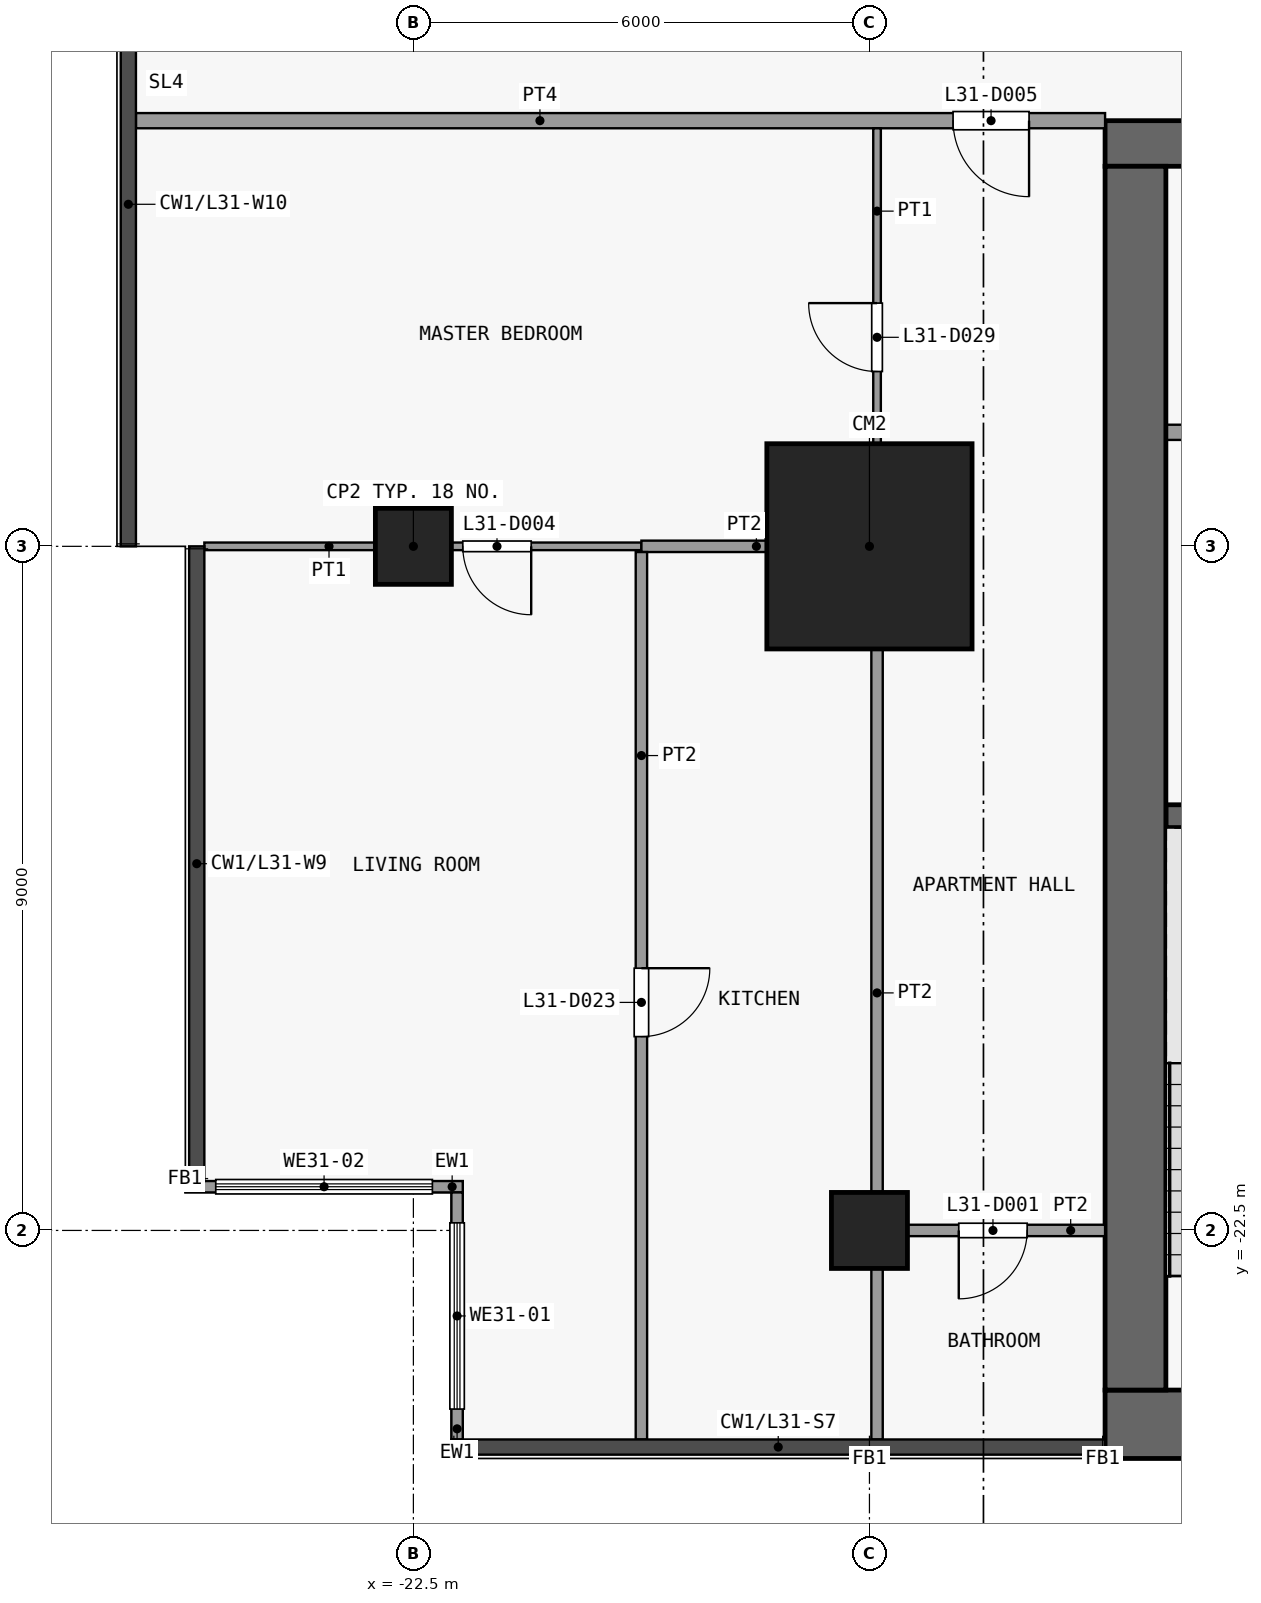
"""IFC4 building model, lengths in metres.
Left out: names, types, materials, properties, quantities, classifications, styles, units other than length and angle.
Written with IfcOpenShell. Run it as: python <this file> out.ifc"""

import sys

from ifc_helpers import new_model, si_unit, direction, frame, frame_2d, origin, origin_2d, place, context, subcontext, project, spatial, rectangle, extrude, element, fill, save


model = new_model("IFC4")
c1 = context("Model", 3, precision=1e-05, world=origin(), true_north=direction((0.0, 1.0)))
c2 = subcontext(c1, "Body", "Model", "MODEL_VIEW")
j1 = project(units=[si_unit("LENGTHUNIT", "METRE"), si_unit("PLANEANGLEUNIT", "RADIAN")], contexts=[c1])
p1 = place(None, origin())
s1 = spatial("IfcSite", under=j1, at=p1, CompositionType="ELEMENT")
p2 = place(p1, origin())
s2 = spatial("IfcBuilding", under=s1, at=p2, CompositionType="ELEMENT")
p3 = place(p2, frame((0.0, 0.0, 124.3)))
s3 = spatial("IfcBuildingStorey", under=s2, at=p3, CompositionType="ELEMENT", Elevation=124.3)
for number, where, z_axis, x_axis in (
    (1, (-22.5, -13.5, 0.0), (0.0, 0.0, 1.0), (1.0, 0.0, 0.0)),
    (2, (-16.5, -22.5, 0.0), (0.0, 0.0, 1.0), (1.0, 0.0, 0.0)),
):
    element("IfcColumn", number, at=place(p3, frame(where, z_axis=z_axis, x_axis=x_axis)), inside=s3, PredefinedType="COLUMN", context=c2, shape_type="SweptSolid", body=[
        extrude(rectangle(XDim=1.0, YDim=1.0, at=origin_2d()), origin(), (0.0, 0.0, 1.0), 3.6),
    ])
p4 = place(p3, frame((-16.5, -13.5, 0.0), z_axis=(0.0, 0.0, 1.0), x_axis=(1.0, 0.0, 0.0)))
e3 = element("IfcColumn", 3, at=p4, inside=s3, PredefinedType="COLUMN", context=c2, shape_type="SweptSolid", body=[
    extrude(rectangle(XDim=2.7, YDim=2.7, at=origin_2d()), origin(), (0.0, 0.0, 1.0), 3.6),
])
p5 = place(p3, frame((-13.4, -25.05, 0.0), z_axis=(0.0, 0.0, 1.0), x_axis=(1.0, 0.0, 0.0)))
e4 = element("IfcWall", 4, at=p5, inside=s3, PredefinedType="SHEAR", context=c2, shape_type="SweptSolid", body=[
    extrude(rectangle(XDim=26.8, YDim=0.9, at=frame_2d((13.4, 0.0))), origin(), (0.0, 0.0, 1.0), 3.3),
])
p6 = place(p3, frame((-13.4, -8.2, 0.0), z_axis=(0.0, 0.0, 1.0), x_axis=(1.0, 0.0, 0.0)))
e5 = element("IfcWall", 5, at=p6, inside=s3, PredefinedType="SHEAR", context=c2, shape_type="SweptSolid", body=[
    extrude(rectangle(XDim=26.8, YDim=0.6, at=frame_2d((13.4, 0.0))), origin(), (0.0, 0.0, 1.0), 3.3),
])
p7 = place(p6, frame((7.7, 0.0, 0.0)))
e6 = element("IfcOpeningElement", 6, at=p7, cuts=e5, PredefinedType="OPENING", context=c2, shape_type="SweptSolid", body=[
    extrude(rectangle(XDim=1.8, YDim=2.1, at=frame_2d((0.9, 1.05))), frame((0.0, 0.31, 0.0), z_axis=(0.0, -1.0, 0.0), x_axis=(1.0, 0.0, 0.0)), (0.0, 0.0, 1.0), 0.62),
])
p8 = place(p6, frame((17.3, 0.0, 0.0)))
e7 = element("IfcOpeningElement", 7, at=p8, cuts=e5, PredefinedType="OPENING", context=c2, shape_type="SweptSolid", body=[
    extrude(rectangle(XDim=1.8, YDim=2.1, at=frame_2d((0.9, 1.05))), frame((0.0, 0.31, 0.0), z_axis=(0.0, -1.0, 0.0), x_axis=(1.0, 0.0, 0.0)), (0.0, 0.0, 1.0), 0.62),
])
p9 = place(p6, frame((2.625, 0.0, 0.0)))
e8 = element("IfcOpeningElement", 8, at=p9, cuts=e5, PredefinedType="OPENING", context=c2, shape_type="SweptSolid", body=[
    extrude(rectangle(XDim=0.9, YDim=2.1, at=frame_2d((0.45, 1.05))), frame((0.0, 0.31, 0.0), z_axis=(0.0, -1.0, 0.0), x_axis=(1.0, 0.0, 0.0)), (0.0, 0.0, 1.0), 0.62),
])
p10 = place(p6, frame((23.975, 0.0, 0.0)))
e9 = element("IfcOpeningElement", 9, at=p10, cuts=e5, PredefinedType="OPENING", context=c2, shape_type="SweptSolid", body=[
    extrude(rectangle(XDim=1.2, YDim=2.1, at=frame_2d((0.6, 1.05))), frame((0.0, 0.31, 0.0), z_axis=(0.0, -1.0, 0.0), x_axis=(1.0, 0.0, 0.0)), (0.0, 0.0, 1.0), 0.62),
])
p11 = place(p3, frame((-13.0, -24.6, 0.0), z_axis=(0.0, 0.0, 1.0), x_axis=(0.0, 1.0, 0.0)))
e10 = element("IfcWall", 10, at=p11, inside=s3, PredefinedType="SHEAR", context=c2, shape_type="SweptSolid", body=[
    extrude(rectangle(XDim=16.1, YDim=0.8, at=frame_2d((8.05, 0.0))), origin(), (0.0, 0.0, 1.0), 3.3),
])
p12 = place(p3, frame((-12.6, -17.05, 0.0), z_axis=(0.0, 0.0, 1.0), x_axis=(1.0, 0.0, 0.0)))
e11 = element("IfcWall", 11, at=p12, inside=s3, PredefinedType="SHEAR", context=c2, shape_type="SweptSolid", body=[
    extrude(rectangle(XDim=2.85, YDim=0.3, at=frame_2d((1.425, 0.0))), origin(), (0.0, 0.0, 1.0), 3.3),
])
p13 = place(p3, frame((-12.6, -12.0, 0.0), z_axis=(0.0, 0.0, 1.0), x_axis=(1.0, 0.0, 0.0)))
e12 = element("IfcWall", 12, at=p13, inside=s3, PredefinedType="PARTITIONING", context=c2, shape_type="SweptSolid", body=[
    extrude(rectangle(XDim=1.45, YDim=0.2, at=frame_2d((0.725, 0.0))), origin(), (0.0, 0.0, 1.0), 3.3),
])
p14 = place(p3, frame((-21.925, -25.25, 0.0), z_axis=(0.0, 0.0, 1.0), x_axis=(0.0, 1.0, 0.0)))
e13 = element("IfcWall", 13, at=p14, inside=s3, PredefinedType="SOLIDWALL", context=c2, shape_type="SweptSolid", body=[
    extrude(rectangle(XDim=3.25, YDim=0.15, at=frame_2d((1.625, 0.0))), origin(), (0.0, 0.0, 1.0), 3.3),
])
p15 = place(p14, frame((0.4, 0.0, 0.9)))
e14 = element("IfcOpeningElement", 14, at=p15, cuts=e13, PredefinedType="OPENING", context=c2, shape_type="SweptSolid", body=[
    extrude(rectangle(XDim=2.45, YDim=2.4, at=frame_2d((1.225, 1.2))), frame((0.0, 0.085, 0.0), z_axis=(0.0, -1.0, 0.0), x_axis=(1.0, 0.0, 0.0)), (0.0, 0.0, 1.0), 0.17),
])
p16 = place(p3, frame((-21.85, -21.925, 0.0), z_axis=(0.0, 0.0, 1.0), x_axis=(-1.0, 0.0, 0.0)))
e15 = element("IfcWall", 15, at=p16, inside=s3, PredefinedType="SOLIDWALL", context=c2, shape_type="SweptSolid", body=[
    extrude(rectangle(XDim=3.65, YDim=0.15, at=frame_2d((1.825, 0.0))), origin(), (0.0, 0.0, 1.0), 3.3),
])
p17 = place(p16, frame((0.4, 0.0, 0.9)))
e16 = element("IfcOpeningElement", 16, at=p17, cuts=e15, PredefinedType="OPENING", context=c2, shape_type="SweptSolid", body=[
    extrude(rectangle(XDim=2.85, YDim=2.4, at=frame_2d((1.425, 1.2))), frame((0.0, 0.085, 0.0), z_axis=(0.0, -1.0, 0.0), x_axis=(1.0, 0.0, 0.0)), (0.0, 0.0, 1.0), 0.17),
])
p18 = place(p3, frame((-16.325, -22.5, 0.0), z_axis=(0.0, 0.0, 1.0), x_axis=(1.0, 0.0, 0.0)))
e17 = element("IfcWall", 17, at=p18, inside=s3, PredefinedType="PARTITIONING", context=c2, shape_type="SweptSolid", body=[
    extrude(rectangle(XDim=2.925, YDim=0.15, at=frame_2d((1.462, 0.0))), origin(), (0.0, 0.0, 1.0), 3.3),
])
p19 = place(p18, frame((1.0, 0.0, 0.0)))
e18 = element("IfcOpeningElement", 18, at=p19, cuts=e17, PredefinedType="OPENING", context=c2, shape_type="SweptSolid", body=[
    extrude(rectangle(XDim=0.9, YDim=2.1, at=frame_2d((0.45, 1.05))), frame((0.0, 0.085, 0.0), z_axis=(0.0, -1.0, 0.0), x_axis=(1.0, 0.0, 0.0)), (0.0, 0.0, 1.0), 0.17),
])
p20 = place(p3, frame((-25.25, -13.5, 0.0), z_axis=(0.0, 0.0, 1.0), x_axis=(1.0, 0.0, 0.0)))
e19 = element("IfcWall", 19, at=p20, inside=s3, PredefinedType="PARTITIONING", context=c2, shape_type="SweptSolid", body=[
    extrude(rectangle(XDim=5.75, YDim=0.1, at=frame_2d((2.875, 0.0))), origin(), (0.0, 0.0, 1.0), 3.3),
])
p21 = place(p20, frame((3.4, 0.0, 0.0)))
e20 = element("IfcOpeningElement", 20, at=p21, cuts=e19, PredefinedType="OPENING", context=c2, shape_type="SweptSolid", body=[
    extrude(rectangle(XDim=0.9, YDim=2.1, at=frame_2d((0.45, 1.05))), frame((0.0, 0.06, 0.0), z_axis=(0.0, -1.0, 0.0), x_axis=(1.0, 0.0, 0.0)), (0.0, 0.0, 1.0), 0.12),
])
p22 = place(p3, frame((-19.5, -13.5, 0.0), z_axis=(0.0, 0.0, 1.0), x_axis=(1.0, 0.0, 0.0)))
e21 = element("IfcWall", 21, at=p22, inside=s3, PredefinedType="PARTITIONING", context=c2, shape_type="SweptSolid", body=[
    extrude(rectangle(XDim=3.025, YDim=0.15, at=frame_2d((1.512, 0.0))), origin(), (0.0, 0.0, 1.0), 3.3),
])
p23 = place(p3, frame((-26.15, -7.9, 0.0), z_axis=(0.0, 0.0, 1.0), x_axis=(1.0, 0.0, 0.0)))
e22 = element("IfcWall", 22, at=p23, inside=s3, PredefinedType="PARTITIONING", context=c2, shape_type="SweptSolid", body=[
    extrude(rectangle(XDim=12.75, YDim=0.2, at=frame_2d((6.375, 0.0))), origin(), (0.0, 0.0, 1.0), 3.3),
])
p24 = place(p23, frame((10.75, 0.0, 0.0)))
e23 = element("IfcOpeningElement", 23, at=p24, cuts=e22, PredefinedType="OPENING", context=c2, shape_type="SweptSolid", body=[
    extrude(rectangle(XDim=1.0, YDim=2.1, at=frame_2d((0.5, 1.05))), frame((0.0, 0.11, 0.0), z_axis=(0.0, -1.0, 0.0), x_axis=(1.0, 0.0, 0.0)), (0.0, 0.0, 1.0), 0.22),
])
p25 = place(p3, frame((-19.5, -25.25, 0.0), z_axis=(0.0, 0.0, 1.0), x_axis=(0.0, 1.0, 0.0)))
e24 = element("IfcWall", 24, at=p25, inside=s3, PredefinedType="PARTITIONING", context=c2, shape_type="SweptSolid", body=[
    extrude(rectangle(XDim=11.675, YDim=0.15, at=frame_2d((5.837, 0.0))), origin(), (0.0, 0.0, 1.0), 3.3),
])
p26 = place(p25, frame((5.3, 0.0, 0.0)))
e25 = element("IfcOpeningElement", 25, at=p26, cuts=e24, PredefinedType="OPENING", context=c2, shape_type="SweptSolid", body=[
    extrude(rectangle(XDim=0.9, YDim=2.1, at=frame_2d((0.45, 1.05))), frame((0.0, 0.085, 0.0), z_axis=(0.0, -1.0, 0.0), x_axis=(1.0, 0.0, 0.0)), (0.0, 0.0, 1.0), 0.17),
])
p27 = place(p3, frame((-16.4, -13.5, 0.0), z_axis=(0.0, 0.0, 1.0), x_axis=(0.0, 1.0, 0.0)))
e26 = element("IfcWall", 26, at=p27, inside=s3, PredefinedType="PARTITIONING", context=c2, shape_type="SweptSolid", body=[
    extrude(rectangle(XDim=5.5, YDim=0.1, at=frame_2d((2.75, 0.0))), origin(), (0.0, 0.0, 1.0), 3.3),
])
p28 = place(p27, frame((2.3, 0.0, 0.0)))
e27 = element("IfcOpeningElement", 27, at=p28, cuts=e26, PredefinedType="OPENING", context=c2, shape_type="SweptSolid", body=[
    extrude(rectangle(XDim=0.9, YDim=2.1, at=frame_2d((0.45, 1.05))), frame((0.0, 0.06, 0.0), z_axis=(0.0, -1.0, 0.0), x_axis=(1.0, 0.0, 0.0)), (0.0, 0.0, 1.0), 0.12),
])
p29 = place(p3, frame((-16.4, -25.25, 0.0), z_axis=(0.0, 0.0, 1.0), x_axis=(0.0, 1.0, 0.0)))
e28 = element("IfcWall", 28, at=p29, inside=s3, PredefinedType="PARTITIONING", context=c2, shape_type="SweptSolid", body=[
    extrude(rectangle(XDim=11.75, YDim=0.15, at=frame_2d((5.875, 0.0))), origin(), (0.0, 0.0, 1.0), 3.3),
])
p30 = place(p15, origin())
e29 = element("IfcWindow", 29, at=p30, inside=s3, PartitioningType="SINGLE_PANEL", PredefinedType="WINDOW", context=c2, shape_type="SweptSolid", body=[
    extrude(rectangle(XDim=2.45, YDim=2.4, at=frame_2d((1.225, 1.2))), frame((0.0, 0.03, 0.0), z_axis=(0.0, -1.0, 0.0), x_axis=(1.0, 0.0, 0.0)), (0.0, 0.0, 1.0), 0.06),
])
fill(e14, e29)
p31 = place(p17, origin())
e30 = element("IfcWindow", 30, at=p31, inside=s3, PartitioningType="SINGLE_PANEL", PredefinedType="WINDOW", context=c2, shape_type="SweptSolid", body=[
    extrude(rectangle(XDim=2.85, YDim=2.4, at=frame_2d((1.425, 1.2))), frame((0.0, 0.03, 0.0), z_axis=(0.0, -1.0, 0.0), x_axis=(1.0, 0.0, 0.0)), (0.0, 0.0, 1.0), 0.06),
])
fill(e16, e30)
p32 = place(p19, origin())
e31 = element("IfcDoor", 31, at=p32, inside=s3, OperationType="SINGLE_SWING_LEFT", PredefinedType="DOOR", context=c2, shape_type="SweptSolid", body=[
    extrude(rectangle(XDim=0.9, YDim=2.1, at=frame_2d((0.45, 1.05))), frame((0.0, 0.025, 0.0), z_axis=(0.0, -1.0, 0.0), x_axis=(1.0, 0.0, 0.0)), (0.0, 0.0, 1.0), 0.05),
])
fill(e18, e31)
p33 = place(p21, origin())
e32 = element("IfcDoor", 32, at=p33, inside=s3, OperationType="SINGLE_SWING_RIGHT", PredefinedType="DOOR", context=c2, shape_type="SweptSolid", body=[
    extrude(rectangle(XDim=0.9, YDim=2.1, at=frame_2d((0.45, 1.05))), frame((0.0, 0.025, 0.0), z_axis=(0.0, -1.0, 0.0), x_axis=(1.0, 0.0, 0.0)), (0.0, 0.0, 1.0), 0.05),
])
fill(e20, e32)
p34 = place(p24, origin())
e33 = element("IfcDoor", 33, at=p34, inside=s3, OperationType="SINGLE_SWING_RIGHT", PredefinedType="DOOR", context=c2, shape_type="SweptSolid", body=[
    extrude(rectangle(XDim=1.0, YDim=2.1, at=frame_2d((0.5, 1.05))), frame((0.0, 0.025, 0.0), z_axis=(0.0, -1.0, 0.0), x_axis=(1.0, 0.0, 0.0)), (0.0, 0.0, 1.0), 0.05),
])
fill(e23, e33)
p35 = place(p26, origin())
e34 = element("IfcDoor", 34, at=p35, inside=s3, OperationType="SINGLE_SWING_RIGHT", PredefinedType="DOOR", context=c2, shape_type="SweptSolid", body=[
    extrude(rectangle(XDim=0.9, YDim=2.1, at=frame_2d((0.45, 1.05))), frame((0.0, 0.025, 0.0), z_axis=(0.0, -1.0, 0.0), x_axis=(1.0, 0.0, 0.0)), (0.0, 0.0, 1.0), 0.05),
])
fill(e25, e34)
p36 = place(p28, origin())
e35 = element("IfcDoor", 35, at=p36, inside=s3, OperationType="SINGLE_SWING_LEFT", PredefinedType="DOOR", context=c2, shape_type="SweptSolid", body=[
    extrude(rectangle(XDim=0.9, YDim=2.1, at=frame_2d((0.45, 1.05))), frame((0.0, 0.025, 0.0), z_axis=(0.0, -1.0, 0.0), x_axis=(1.0, 0.0, 0.0)), (0.0, 0.0, 1.0), 0.05),
])
fill(e27, e35)
save(model, sys.argv[1])
